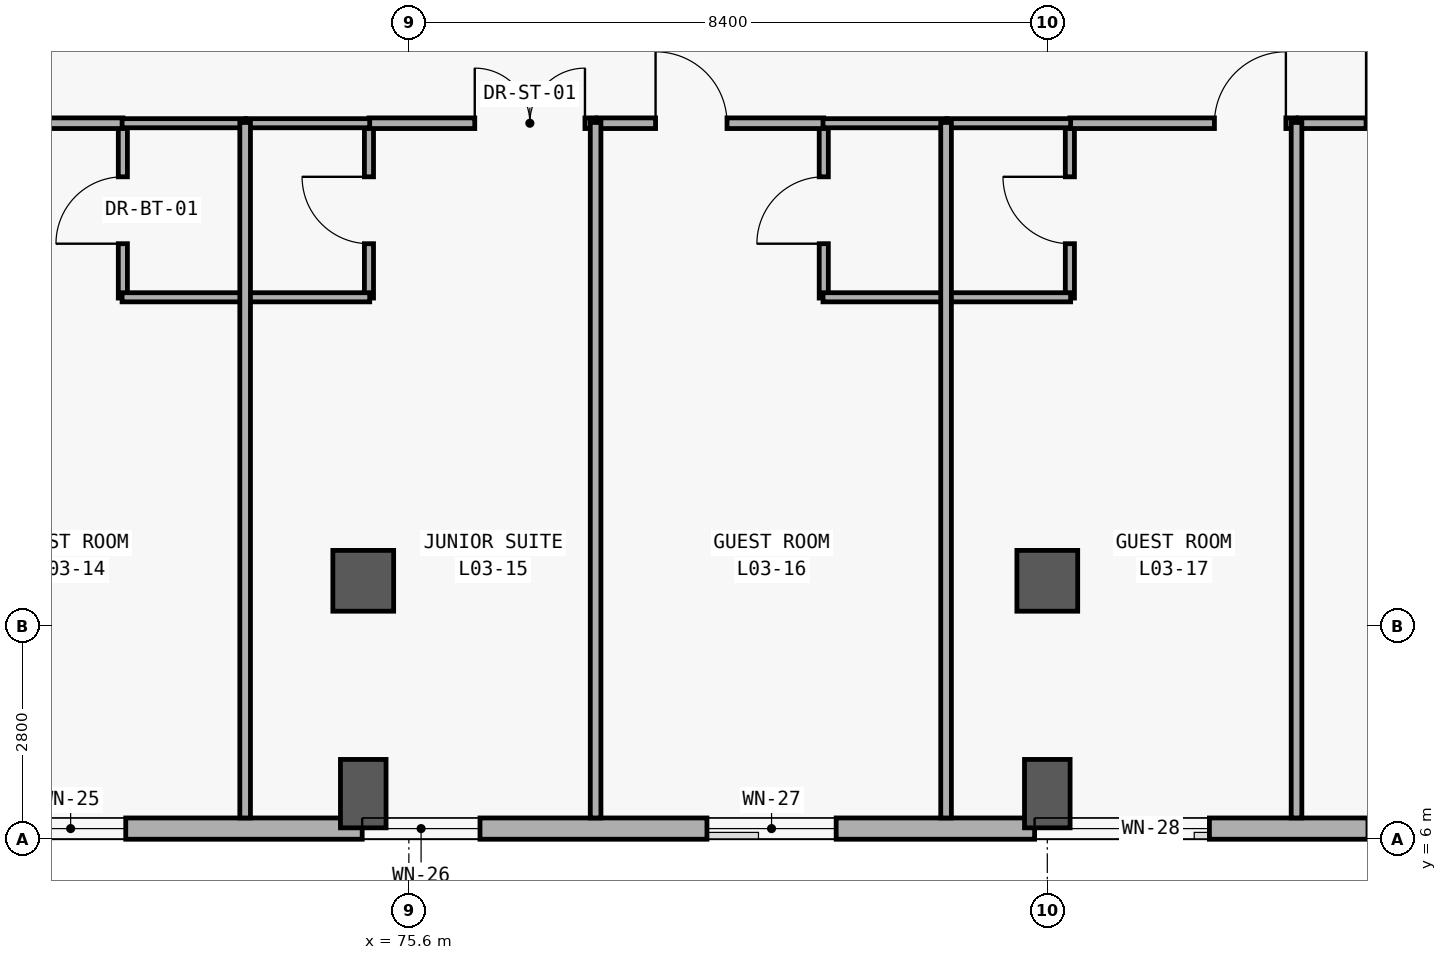
"""IFC4 building model, lengths in metres.
Left out: names, types, materials, properties, quantities, classifications, styles, units other than length and angle.
Written with IfcOpenShell. Run it as: python <this file> out.ifc"""

import sys

from ifc_helpers import new_model, si_unit, direction, frame, frame_2d, origin, origin_2d, place, context, subcontext, project, spatial, rectangle, extrude, element, fill, save


model = new_model("IFC4")
c1 = context("Model", 3, precision=1e-05, world=origin(), true_north=direction((0.0, 1.0)))
c2 = subcontext(c1, "Body", "Model", "MODEL_VIEW")
j1 = project(units=[si_unit("LENGTHUNIT", "METRE"), si_unit("PLANEANGLEUNIT", "RADIAN")], contexts=[c1])
p1 = place(None, origin())
s1 = spatial("IfcSite", under=j1, at=p1, CompositionType="ELEMENT")
p2 = place(p1, origin())
s2 = spatial("IfcBuilding", under=s1, at=p2, CompositionType="ELEMENT")
p3 = place(p2, frame((0.0, 0.0, 15.0)))
s3 = spatial("IfcBuildingStorey", under=s2, at=p3, CompositionType="ELEMENT", Elevation=15.0)
p4 = place(p3, frame((75.0, 6.6, 0.0), z_axis=(0.0, 0.0, 1.0), x_axis=(0.0, 1.0, 0.0)))
e1 = element("IfcColumn", 1, at=p4, inside=s3, PredefinedType="COLUMN", context=c2, shape_type="SweptSolid", body=[
    extrude(rectangle(XDim=0.6, YDim=0.9, at=origin_2d()), origin(), (0.0, 0.0, 1.0), 4.2),
])
p5 = place(p3, frame((75.0, 9.4, 0.0), z_axis=(0.0, 0.0, 1.0), x_axis=(1.0, 0.0, 0.0)))
e2 = element("IfcColumn", 2, at=p5, inside=s3, PredefinedType="COLUMN", context=c2, shape_type="SweptSolid", body=[
    extrude(rectangle(XDim=0.8, YDim=0.8, at=origin_2d()), origin(), (0.0, 0.0, 1.0), 4.2),
])
p6 = place(p3, frame((84.0, 6.6, 0.0), z_axis=(0.0, 0.0, 1.0), x_axis=(0.0, 1.0, 0.0)))
e3 = element("IfcColumn", 3, at=p6, inside=s3, PredefinedType="COLUMN", context=c2, shape_type="SweptSolid", body=[
    extrude(rectangle(XDim=0.6, YDim=0.9, at=origin_2d()), origin(), (0.0, 0.0, 1.0), 4.2),
])
p7 = place(p3, frame((84.0, 9.4, 0.0), z_axis=(0.0, 0.0, 1.0), x_axis=(1.0, 0.0, 0.0)))
e4 = element("IfcColumn", 4, at=p7, inside=s3, PredefinedType="COLUMN", context=c2, shape_type="SweptSolid", body=[
    extrude(rectangle(XDim=0.8, YDim=0.8, at=origin_2d()), origin(), (0.0, 0.0, 1.0), 4.2),
])
p8 = place(p3, frame((92.12, 6.14, 0.0), z_axis=(0.0, 0.0, 1.0), x_axis=(-1.0, 0.0, 0.0)))
e5 = element("IfcWall", 5, at=p8, inside=s3, PredefinedType="SOLIDWALL", context=c2, shape_type="SweptSolid", body=[
    extrude(rectangle(XDim=83.44, YDim=0.28, at=frame_2d((41.72, 0.0))), origin(), (0.0, 0.0, 1.0), 3.92),
])
p9 = place(p8, frame((79.49, 0.0, 0.85)))
e6 = element("IfcOpeningElement", 6, at=p9, cuts=e5, PredefinedType="OPENING", context=c2, shape_type="SweptSolid", body=[
    extrude(rectangle(XDim=2.85, YDim=1.85, at=frame_2d((1.425, 0.925))), frame((0.0, 0.15, 0.0), z_axis=(0.0, -1.0, 0.0), x_axis=(1.0, 0.0, 0.0)), (0.0, 0.0, 1.0), 0.3),
])
p10 = place(p8, frame((74.704, 0.0, 0.85)))
e7 = element("IfcOpeningElement", 7, at=p10, cuts=e5, PredefinedType="OPENING", context=c2, shape_type="SweptSolid", body=[
    extrude(rectangle(XDim=3.2, YDim=1.95, at=frame_2d((1.6, 0.975))), frame((0.0, 0.15, 0.0), z_axis=(0.0, -1.0, 0.0), x_axis=(1.0, 0.0, 0.0)), (0.0, 0.0, 1.0), 0.3),
])
p11 = place(p8, frame((69.942, 0.0, 0.85)))
e8 = element("IfcOpeningElement", 8, at=p11, cuts=e5, PredefinedType="OPENING", context=c2, shape_type="SweptSolid", body=[
    extrude(rectangle(XDim=3.5, YDim=2.0, at=frame_2d((1.75, 1.0))), frame((0.0, 0.15, 0.0), z_axis=(0.0, -1.0, 0.0), x_axis=(1.0, 0.0, 0.0)), (0.0, 0.0, 1.0), 0.3),
])
p12 = place(p8, frame((66.382, 0.0, 0.85)))
e9 = element("IfcOpeningElement", 9, at=p12, cuts=e5, PredefinedType="OPENING", context=c2, shape_type="SweptSolid", body=[
    extrude(rectangle(XDim=1.4, YDim=1.6, at=frame_2d((0.7, 0.8))), frame((0.0, 0.15, 0.0), z_axis=(0.0, -1.0, 0.0), x_axis=(1.0, 0.0, 0.0)), (0.0, 0.0, 1.0), 0.3),
])
p13 = place(p8, frame((61.67, 0.0, 0.85)))
e10 = element("IfcOpeningElement", 10, at=p13, cuts=e5, PredefinedType="OPENING", context=c2, shape_type="SweptSolid", body=[
    extrude(rectangle(XDim=1.6, YDim=1.6, at=frame_2d((0.8, 0.8))), frame((0.0, 0.15, 0.0), z_axis=(0.0, -1.0, 0.0), x_axis=(1.0, 0.0, 0.0)), (0.0, 0.0, 1.0), 0.3),
])
p14 = place(p8, frame((56.959, 0.0, 0.85)))
e11 = element("IfcOpeningElement", 11, at=p14, cuts=e5, PredefinedType="OPENING", context=c2, shape_type="SweptSolid", body=[
    extrude(rectangle(XDim=1.8, YDim=1.6, at=frame_2d((0.9, 0.8))), frame((0.0, 0.15, 0.0), z_axis=(0.0, -1.0, 0.0), x_axis=(1.0, 0.0, 0.0)), (0.0, 0.0, 1.0), 0.3),
])
p15 = place(p8, frame((52.248, 0.0, 0.85)))
e12 = element("IfcOpeningElement", 12, at=p15, cuts=e5, PredefinedType="OPENING", context=c2, shape_type="SweptSolid", body=[
    extrude(rectangle(XDim=2.0, YDim=1.65, at=frame_2d((1.0, 0.825))), frame((0.0, 0.15, 0.0), z_axis=(0.0, -1.0, 0.0), x_axis=(1.0, 0.0, 0.0)), (0.0, 0.0, 1.0), 0.3),
])
p16 = place(p8, frame((47.536, 0.0, 0.85)))
e13 = element("IfcOpeningElement", 13, at=p16, cuts=e5, PredefinedType="OPENING", context=c2, shape_type="SweptSolid", body=[
    extrude(rectangle(XDim=2.2, YDim=1.65, at=frame_2d((1.1, 0.825))), frame((0.0, 0.15, 0.0), z_axis=(0.0, -1.0, 0.0), x_axis=(1.0, 0.0, 0.0)), (0.0, 0.0, 1.0), 0.3),
])
p17 = place(p8, frame((42.726, 0.0, 0.85)))
e14 = element("IfcOpeningElement", 14, at=p17, cuts=e5, PredefinedType="OPENING", context=c2, shape_type="SweptSolid", body=[
    extrude(rectangle(XDim=2.6, YDim=2.2, at=frame_2d((1.3, 1.1))), frame((0.0, 0.15, 0.0), z_axis=(0.0, -1.0, 0.0), x_axis=(1.0, 0.0, 0.0)), (0.0, 0.0, 1.0), 0.3),
])
p18 = place(p8, frame((37.865, 0.0, 0.85)))
e15 = element("IfcOpeningElement", 15, at=p18, cuts=e5, PredefinedType="OPENING", context=c2, shape_type="SweptSolid", body=[
    extrude(rectangle(XDim=3.1, YDim=2.2, at=frame_2d((1.55, 1.1))), frame((0.0, 0.15, 0.0), z_axis=(0.0, -1.0, 0.0), x_axis=(1.0, 0.0, 0.0)), (0.0, 0.0, 1.0), 0.3),
])
p19 = place(p8, frame((33.004, 0.0, 0.85)))
e16 = element("IfcOpeningElement", 16, at=p19, cuts=e5, PredefinedType="OPENING", context=c2, shape_type="SweptSolid", body=[
    extrude(rectangle(XDim=3.6, YDim=2.3, at=frame_2d((1.8, 1.15))), frame((0.0, 0.15, 0.0), z_axis=(0.0, -1.0, 0.0), x_axis=(1.0, 0.0, 0.0)), (0.0, 0.0, 1.0), 0.3),
])
p20 = place(p8, frame((29.568, 0.0, 0.85)))
e17 = element("IfcOpeningElement", 17, at=p20, cuts=e5, PredefinedType="OPENING", context=c2, shape_type="SweptSolid", body=[
    extrude(rectangle(XDim=1.25, YDim=1.45, at=frame_2d((0.625, 0.725))), frame((0.0, 0.15, 0.0), z_axis=(0.0, -1.0, 0.0), x_axis=(1.0, 0.0, 0.0)), (0.0, 0.0, 1.0), 0.3),
])
p21 = place(p8, frame((24.907, 0.0, 0.85)))
e18 = element("IfcOpeningElement", 18, at=p21, cuts=e5, PredefinedType="OPENING", context=c2, shape_type="SweptSolid", body=[
    extrude(rectangle(XDim=1.35, YDim=1.55, at=frame_2d((0.675, 0.775))), frame((0.0, 0.15, 0.0), z_axis=(0.0, -1.0, 0.0), x_axis=(1.0, 0.0, 0.0)), (0.0, 0.0, 1.0), 0.3),
])
p22 = place(p8, frame((20.245, 0.0, 0.85)))
e19 = element("IfcOpeningElement", 19, at=p22, cuts=e5, PredefinedType="OPENING", context=c2, shape_type="SweptSolid", body=[
    extrude(rectangle(XDim=1.45, YDim=1.65, at=frame_2d((0.725, 0.825))), frame((0.0, 0.15, 0.0), z_axis=(0.0, -1.0, 0.0), x_axis=(1.0, 0.0, 0.0)), (0.0, 0.0, 1.0), 0.3),
])
p23 = place(p8, frame((15.584, 0.0, 0.85)))
e20 = element("IfcOpeningElement", 20, at=p23, cuts=e5, PredefinedType="OPENING", context=c2, shape_type="SweptSolid", body=[
    extrude(rectangle(XDim=1.55, YDim=1.65, at=frame_2d((0.775, 0.825))), frame((0.0, 0.15, 0.0), z_axis=(0.0, -1.0, 0.0), x_axis=(1.0, 0.0, 0.0)), (0.0, 0.0, 1.0), 0.3),
])
p24 = place(p8, frame((10.898, 0.0, 0.85)))
e21 = element("IfcOpeningElement", 21, at=p24, cuts=e5, PredefinedType="OPENING", context=c2, shape_type="SweptSolid", body=[
    extrude(rectangle(XDim=1.7, YDim=2.0, at=frame_2d((0.85, 1.0))), frame((0.0, 0.15, 0.0), z_axis=(0.0, -1.0, 0.0), x_axis=(1.0, 0.0, 0.0)), (0.0, 0.0, 1.0), 0.3),
])
p25 = place(p8, frame((5.987, 0.0, 0.85)))
e22 = element("IfcOpeningElement", 22, at=p25, cuts=e5, PredefinedType="OPENING", context=c2, shape_type="SweptSolid", body=[
    extrude(rectangle(XDim=2.3, YDim=2.05, at=frame_2d((1.15, 1.025))), frame((0.0, 0.15, 0.0), z_axis=(0.0, -1.0, 0.0), x_axis=(1.0, 0.0, 0.0)), (0.0, 0.0, 1.0), 0.3),
])
p26 = place(p8, frame((1.151, 0.0, 0.85)))
e23 = element("IfcOpeningElement", 23, at=p26, cuts=e5, PredefinedType="OPENING", context=c2, shape_type="SweptSolid", body=[
    extrude(rectangle(XDim=2.75, YDim=2.1, at=frame_2d((1.375, 1.05))), frame((0.0, 0.15, 0.0), z_axis=(0.0, -1.0, 0.0), x_axis=(1.0, 0.0, 0.0)), (0.0, 0.0, 1.0), 0.3),
])
p27 = place(p3, frame((71.837, 13.12, 0.0), z_axis=(0.0, 0.0, 1.0), x_axis=(0.0, 1.0, 0.0)))
e24 = element("IfcWall", 24, at=p27, inside=s3, PredefinedType="PARTITIONING", context=c2, shape_type="SweptSolid", body=[
    extrude(rectangle(XDim=2.31, YDim=0.12, at=frame_2d((1.155, 0.0))), origin(), (0.0, 0.0, 1.0), 3.02),
])
p28 = place(p27, frame((0.715, 0.0, 0.0)))
e25 = element("IfcOpeningElement", 25, at=p28, cuts=e24, PredefinedType="OPENING", context=c2, shape_type="SweptSolid", body=[
    extrude(rectangle(XDim=0.88, YDim=2.15, at=frame_2d((0.44, 1.075))), frame((0.0, 0.07, 0.0), z_axis=(0.0, -1.0, 0.0), x_axis=(1.0, 0.0, 0.0)), (0.0, 0.0, 1.0), 0.14),
])
p29 = place(p3, frame((75.075, 13.12, 0.0), z_axis=(0.0, 0.0, 1.0), x_axis=(0.0, 1.0, 0.0)))
e26 = element("IfcWall", 26, at=p29, inside=s3, PredefinedType="PARTITIONING", context=c2, shape_type="SweptSolid", body=[
    extrude(rectangle(XDim=2.31, YDim=0.12, at=frame_2d((1.155, 0.0))), origin(), (0.0, 0.0, 1.0), 3.02),
])
p30 = place(p29, frame((0.715, 0.0, 0.0)))
e27 = element("IfcOpeningElement", 27, at=p30, cuts=e26, PredefinedType="OPENING", context=c2, shape_type="SweptSolid", body=[
    extrude(rectangle(XDim=0.88, YDim=2.15, at=frame_2d((0.44, 1.075))), frame((0.0, 0.07, 0.0), z_axis=(0.0, -1.0, 0.0), x_axis=(1.0, 0.0, 0.0)), (0.0, 0.0, 1.0), 0.14),
])
p31 = place(p3, frame((81.059, 13.12, 0.0), z_axis=(0.0, 0.0, 1.0), x_axis=(0.0, 1.0, 0.0)))
e28 = element("IfcWall", 28, at=p31, inside=s3, PredefinedType="PARTITIONING", context=c2, shape_type="SweptSolid", body=[
    extrude(rectangle(XDim=2.31, YDim=0.12, at=frame_2d((1.155, 0.0))), origin(), (0.0, 0.0, 1.0), 3.02),
])
p32 = place(p31, frame((0.715, 0.0, 0.0)))
e29 = element("IfcOpeningElement", 29, at=p32, cuts=e28, PredefinedType="OPENING", context=c2, shape_type="SweptSolid", body=[
    extrude(rectangle(XDim=0.88, YDim=2.15, at=frame_2d((0.44, 1.075))), frame((0.0, 0.07, 0.0), z_axis=(0.0, -1.0, 0.0), x_axis=(1.0, 0.0, 0.0)), (0.0, 0.0, 1.0), 0.14),
])
p33 = place(p3, frame((84.297, 13.12, 0.0), z_axis=(0.0, 0.0, 1.0), x_axis=(0.0, 1.0, 0.0)))
e30 = element("IfcWall", 30, at=p33, inside=s3, PredefinedType="PARTITIONING", context=c2, shape_type="SweptSolid", body=[
    extrude(rectangle(XDim=2.31, YDim=0.12, at=frame_2d((1.155, 0.0))), origin(), (0.0, 0.0, 1.0), 3.02),
])
p34 = place(p33, frame((0.715, 0.0, 0.0)))
e31 = element("IfcOpeningElement", 31, at=p34, cuts=e30, PredefinedType="OPENING", context=c2, shape_type="SweptSolid", body=[
    extrude(rectangle(XDim=0.88, YDim=2.15, at=frame_2d((0.44, 1.075))), frame((0.0, 0.07, 0.0), z_axis=(0.0, -1.0, 0.0), x_axis=(1.0, 0.0, 0.0)), (0.0, 0.0, 1.0), 0.14),
])
p35 = place(p3, frame((68.854, 15.42, 0.0), z_axis=(0.0, 0.0, 1.0), x_axis=(1.0, 0.0, 0.0)))
e32 = element("IfcWall", 32, at=p35, inside=s3, PredefinedType="PARTITIONING", context=c2, shape_type="SweptSolid", body=[
    extrude(rectangle(XDim=2.983, YDim=0.14, at=frame_2d((1.491, 0.0))), origin(), (0.0, 0.0, 1.0), 3.02),
])
p36 = place(p35, frame((0.203, 0.0, 0.0)))
e33 = element("IfcOpeningElement", 33, at=p36, cuts=e32, PredefinedType="OPENING", context=c2, shape_type="SweptSolid", body=[
    extrude(rectangle(XDim=0.94, YDim=2.2, at=frame_2d((0.47, 1.1))), frame((0.0, 0.08, 0.0), z_axis=(0.0, -1.0, 0.0), x_axis=(1.0, 0.0, 0.0)), (0.0, 0.0, 1.0), 0.16),
])
p37 = place(p3, frame((75.075, 15.42, 0.0), z_axis=(0.0, 0.0, 1.0), x_axis=(1.0, 0.0, 0.0)))
e34 = element("IfcWall", 34, at=p37, inside=s3, PredefinedType="PARTITIONING", context=c2, shape_type="SweptSolid", body=[
    extrude(rectangle(XDim=2.982, YDim=0.14, at=frame_2d((1.491, 0.0))), origin(), (0.0, 0.0, 1.0), 3.02),
])
p38 = place(p37, frame((1.392, 0.0, 0.0)))
e35 = element("IfcOpeningElement", 35, at=p38, cuts=e34, PredefinedType="OPENING", context=c2, shape_type="SweptSolid", body=[
    extrude(rectangle(XDim=1.45, YDim=2.3, at=frame_2d((0.725, 1.15))), frame((0.0, 0.08, 0.0), z_axis=(0.0, -1.0, 0.0), x_axis=(1.0, 0.0, 0.0)), (0.0, 0.0, 1.0), 0.16),
])
p39 = place(p3, frame((78.077, 15.42, 0.0), z_axis=(0.0, 0.0, 1.0), x_axis=(1.0, 0.0, 0.0)))
e36 = element("IfcWall", 36, at=p39, inside=s3, PredefinedType="PARTITIONING", context=c2, shape_type="SweptSolid", body=[
    extrude(rectangle(XDim=2.982, YDim=0.14, at=frame_2d((1.491, 0.0))), origin(), (0.0, 0.0, 1.0), 3.02),
])
p40 = place(p39, frame((0.769, 0.0, 0.0)))
e37 = element("IfcOpeningElement", 37, at=p40, cuts=e36, PredefinedType="OPENING", context=c2, shape_type="SweptSolid", body=[
    extrude(rectangle(XDim=0.94, YDim=2.2, at=frame_2d((0.47, 1.1))), frame((0.0, 0.08, 0.0), z_axis=(0.0, -1.0, 0.0), x_axis=(1.0, 0.0, 0.0)), (0.0, 0.0, 1.0), 0.16),
])
p41 = place(p3, frame((84.297, 15.42, 0.0), z_axis=(0.0, 0.0, 1.0), x_axis=(1.0, 0.0, 0.0)))
e38 = element("IfcWall", 38, at=p41, inside=s3, PredefinedType="PARTITIONING", context=c2, shape_type="SweptSolid", body=[
    extrude(rectangle(XDim=2.982, YDim=0.14, at=frame_2d((1.491, 0.0))), origin(), (0.0, 0.0, 1.0), 3.02),
])
p42 = place(p41, frame((1.902, 0.0, 0.0)))
e39 = element("IfcOpeningElement", 39, at=p42, cuts=e38, PredefinedType="OPENING", context=c2, shape_type="SweptSolid", body=[
    extrude(rectangle(XDim=0.94, YDim=2.2, at=frame_2d((0.47, 1.1))), frame((0.0, 0.08, 0.0), z_axis=(0.0, -1.0, 0.0), x_axis=(1.0, 0.0, 0.0)), (0.0, 0.0, 1.0), 0.16),
])
p43 = place(p3, frame((87.299, 15.42, 0.0), z_axis=(0.0, 0.0, 1.0), x_axis=(1.0, 0.0, 0.0)))
e40 = element("IfcWall", 40, at=p43, inside=s3, PredefinedType="PARTITIONING", context=c2, shape_type="SweptSolid", body=[
    extrude(rectangle(XDim=2.982, YDim=0.14, at=frame_2d((1.491, 0.0))), origin(), (0.0, 0.0, 1.0), 3.02),
])
p44 = place(p43, frame((0.895, 0.0, 0.0)))
e41 = element("IfcOpeningElement", 41, at=p44, cuts=e40, PredefinedType="OPENING", context=c2, shape_type="SweptSolid", body=[
    extrude(rectangle(XDim=0.94, YDim=2.2, at=frame_2d((0.47, 1.1))), frame((0.0, 0.08, 0.0), z_axis=(0.0, -1.0, 0.0), x_axis=(1.0, 0.0, 0.0)), (0.0, 0.0, 1.0), 0.16),
])
for number, where, z_axis, x_axis in (
    (42, (71.827, 13.13, 0.0), (0.0, 0.0, 1.0), (1.0, 0.0, 0.0)),
    (43, (71.827, 15.42, 0.0), (0.0, 0.0, 1.0), (1.0, 0.0, 0.0)),
):
    element("IfcWall", number, at=place(p3, frame(where, z_axis=z_axis, x_axis=x_axis)), inside=s3, PredefinedType="PARTITIONING", context=c2, shape_type="SweptSolid", body=[
        extrude(rectangle(XDim=1.629, YDim=0.12, at=frame_2d((0.814, 0.0))), origin(), (0.0, 0.0, 1.0), 3.02),
    ])
for number, where, z_axis, x_axis in (
    (44, (73.456, 13.13, 0.0), (0.0, 0.0, 1.0), (1.0, 0.0, 0.0)),
    (45, (73.456, 15.42, 0.0), (0.0, 0.0, 1.0), (1.0, 0.0, 0.0)),
    (46, (81.049, 13.13, 0.0), (0.0, 0.0, 1.0), (1.0, 0.0, 0.0)),
    (47, (81.049, 15.42, 0.0), (0.0, 0.0, 1.0), (1.0, 0.0, 0.0)),
    (48, (82.678, 13.13, 0.0), (0.0, 0.0, 1.0), (1.0, 0.0, 0.0)),
    (49, (82.678, 15.42, 0.0), (0.0, 0.0, 1.0), (1.0, 0.0, 0.0)),
):
    element("IfcWall", number, at=place(p3, frame(where, z_axis=z_axis, x_axis=x_axis)), inside=s3, PredefinedType="PARTITIONING", context=c2, shape_type="SweptSolid", body=[
        extrude(rectangle(XDim=1.629, YDim=0.12, at=frame_2d((0.814, 0.0))), origin(), (0.0, 0.0, 1.0), 3.02),
    ])
for number, where, z_axis, x_axis in (
    (50, (73.446, 6.28, 0.0), (0.0, 0.0, 1.0), (0.0, 1.0, 0.0)),
    (51, (78.057, 6.28, 0.0), (0.0, 0.0, 1.0), (0.0, 1.0, 0.0)),
    (52, (82.668, 6.28, 0.0), (0.0, 0.0, 1.0), (0.0, 1.0, 0.0)),
    (53, (87.279, 6.28, 0.0), (0.0, 0.0, 1.0), (0.0, 1.0, 0.0)),
):
    element("IfcWall", number, at=place(p3, frame(where, z_axis=z_axis, x_axis=x_axis)), inside=s3, PredefinedType="PARTITIONING", context=c2, shape_type="SweptSolid", body=[
        extrude(rectangle(XDim=9.15, YDim=0.14, at=frame_2d((4.575, 0.0))), origin(), (0.0, 0.0, 1.0), 3.02),
    ])
p45 = place(p22, origin())
e54 = element("IfcWindow", 54, at=p45, inside=s3, PartitioningType="SINGLE_PANEL", PredefinedType="WINDOW", context=c2, shape_type="SweptSolid", body=[
    extrude(rectangle(XDim=1.45, YDim=1.65, at=frame_2d((0.725, 0.825))), frame((0.0, 0.03, 0.0), z_axis=(0.0, -1.0, 0.0), x_axis=(1.0, 0.0, 0.0)), (0.0, 0.0, 1.0), 0.06),
])
fill(e19, e54)
p46 = place(p23, origin())
e55 = element("IfcWindow", 55, at=p46, inside=s3, PartitioningType="SINGLE_PANEL", PredefinedType="WINDOW", context=c2, shape_type="SweptSolid", body=[
    extrude(rectangle(XDim=1.55, YDim=1.65, at=frame_2d((0.775, 0.825))), frame((0.0, 0.03, 0.0), z_axis=(0.0, -1.0, 0.0), x_axis=(1.0, 0.0, 0.0)), (0.0, 0.0, 1.0), 0.06),
])
fill(e20, e55)
p47 = place(p24, origin())
e56 = element("IfcWindow", 56, at=p47, inside=s3, PartitioningType="SINGLE_PANEL", PredefinedType="WINDOW", context=c2, shape_type="SweptSolid", body=[
    extrude(rectangle(XDim=1.7, YDim=2.0, at=frame_2d((0.85, 1.0))), frame((0.0, 0.03, 0.0), z_axis=(0.0, -1.0, 0.0), x_axis=(1.0, 0.0, 0.0)), (0.0, 0.0, 1.0), 0.06),
])
fill(e21, e56)
p48 = place(p25, origin())
e57 = element("IfcWindow", 57, at=p48, inside=s3, PartitioningType="SINGLE_PANEL", PredefinedType="WINDOW", context=c2, shape_type="SweptSolid", body=[
    extrude(rectangle(XDim=2.3, YDim=2.05, at=frame_2d((1.15, 1.025))), frame((0.0, 0.03, 0.0), z_axis=(0.0, -1.0, 0.0), x_axis=(1.0, 0.0, 0.0)), (0.0, 0.0, 1.0), 0.06),
])
fill(e22, e57)
p49 = place(p28, origin())
e58 = element("IfcDoor", 58, at=p49, inside=s3, OperationType="SINGLE_SWING_LEFT", PredefinedType="DOOR", context=c2, shape_type="SweptSolid", body=[
    extrude(rectangle(XDim=0.88, YDim=2.15, at=frame_2d((0.44, 1.075))), frame((0.0, 0.025, 0.0), z_axis=(0.0, -1.0, 0.0), x_axis=(1.0, 0.0, 0.0)), (0.0, 0.0, 1.0), 0.05),
])
fill(e25, e58)
p50 = place(p30, origin())
e59 = element("IfcDoor", 59, at=p50, inside=s3, OperationType="SINGLE_SWING_RIGHT", PredefinedType="DOOR", context=c2, shape_type="SweptSolid", body=[
    extrude(rectangle(XDim=0.88, YDim=2.15, at=frame_2d((0.44, 1.075))), frame((0.0, 0.025, 0.0), z_axis=(0.0, -1.0, 0.0), x_axis=(1.0, 0.0, 0.0)), (0.0, 0.0, 1.0), 0.05),
])
fill(e27, e59)
p51 = place(p32, origin())
e60 = element("IfcDoor", 60, at=p51, inside=s3, OperationType="SINGLE_SWING_LEFT", PredefinedType="DOOR", context=c2, shape_type="SweptSolid", body=[
    extrude(rectangle(XDim=0.88, YDim=2.15, at=frame_2d((0.44, 1.075))), frame((0.0, 0.025, 0.0), z_axis=(0.0, -1.0, 0.0), x_axis=(1.0, 0.0, 0.0)), (0.0, 0.0, 1.0), 0.05),
])
fill(e29, e60)
p52 = place(p34, origin())
e61 = element("IfcDoor", 61, at=p52, inside=s3, OperationType="SINGLE_SWING_RIGHT", PredefinedType="DOOR", context=c2, shape_type="SweptSolid", body=[
    extrude(rectangle(XDim=0.88, YDim=2.15, at=frame_2d((0.44, 1.075))), frame((0.0, 0.025, 0.0), z_axis=(0.0, -1.0, 0.0), x_axis=(1.0, 0.0, 0.0)), (0.0, 0.0, 1.0), 0.05),
])
fill(e31, e61)
p53 = place(p38, origin())
e62 = element("IfcDoor", 62, at=p53, inside=s3, OperationType="DOUBLE_DOOR_SINGLE_SWING", PredefinedType="DOOR", context=c2, shape_type="SweptSolid", body=[
    extrude(rectangle(XDim=1.45, YDim=2.3, at=frame_2d((0.725, 1.15))), frame((0.0, 0.025, 0.0), z_axis=(0.0, -1.0, 0.0), x_axis=(1.0, 0.0, 0.0)), (0.0, 0.0, 1.0), 0.05),
])
fill(e35, e62)
p54 = place(p40, origin())
e63 = element("IfcDoor", 63, at=p54, inside=s3, OperationType="SINGLE_SWING_LEFT", PredefinedType="DOOR", context=c2, shape_type="SweptSolid", body=[
    extrude(rectangle(XDim=0.94, YDim=2.2, at=frame_2d((0.47, 1.1))), frame((0.0, 0.025, 0.0), z_axis=(0.0, -1.0, 0.0), x_axis=(1.0, 0.0, 0.0)), (0.0, 0.0, 1.0), 0.05),
])
fill(e37, e63)
p55 = place(p42, origin())
e64 = element("IfcDoor", 64, at=p55, inside=s3, OperationType="SINGLE_SWING_RIGHT", PredefinedType="DOOR", context=c2, shape_type="SweptSolid", body=[
    extrude(rectangle(XDim=0.94, YDim=2.2, at=frame_2d((0.47, 1.1))), frame((0.0, 0.025, 0.0), z_axis=(0.0, -1.0, 0.0), x_axis=(1.0, 0.0, 0.0)), (0.0, 0.0, 1.0), 0.05),
])
fill(e39, e64)
p56 = place(p44, origin())
e65 = element("IfcDoor", 65, at=p56, inside=s3, OperationType="SINGLE_SWING_LEFT", PredefinedType="DOOR", context=c2, shape_type="SweptSolid", body=[
    extrude(rectangle(XDim=0.94, YDim=2.2, at=frame_2d((0.47, 1.1))), frame((0.0, 0.025, 0.0), z_axis=(0.0, -1.0, 0.0), x_axis=(1.0, 0.0, 0.0)), (0.0, 0.0, 1.0), 0.05),
])
fill(e41, e65)
save(model, sys.argv[1])
